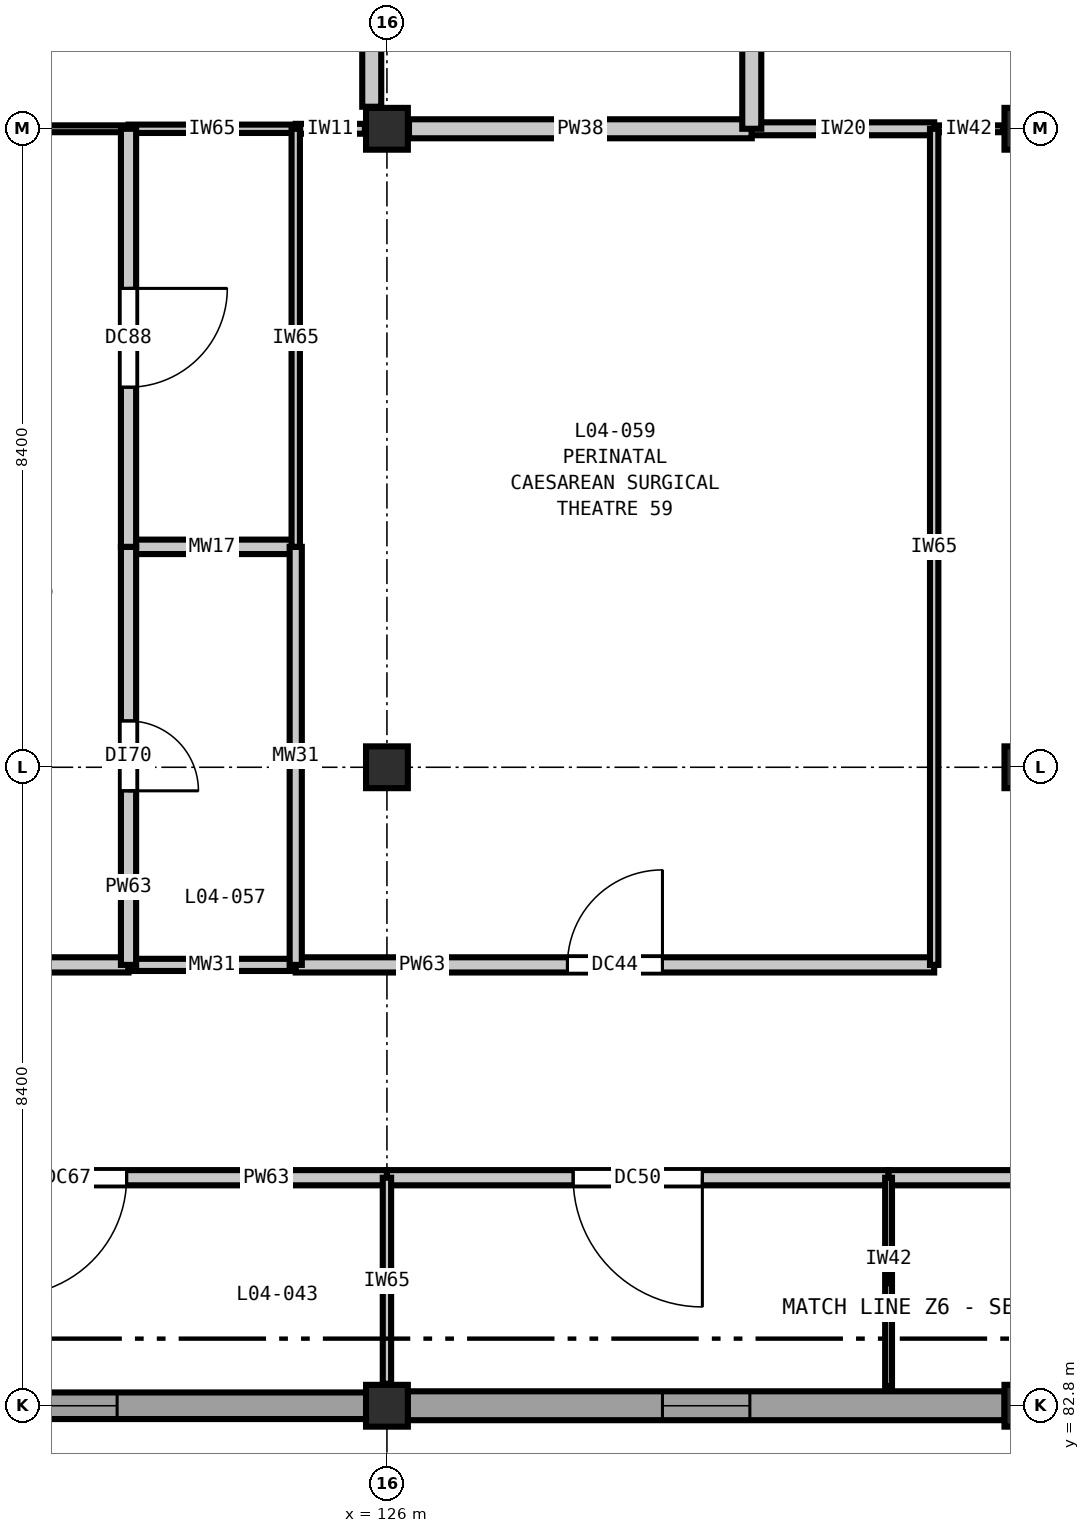
"""IFC4 building model, lengths in metres.
Left out: names, types, materials, properties, quantities, classifications, styles, units other than length and angle.
Written with IfcOpenShell. Run it as: python <this file> out.ifc"""

import sys

from ifc_helpers import new_model, si_unit, direction, frame, frame_2d, origin, origin_2d, place, context, subcontext, project, spatial, rectangle, extrude, element, fill, save


model = new_model("IFC4")
c1 = context("Model", 3, precision=1e-05, world=origin(), true_north=direction((0.0, 1.0)))
c2 = subcontext(c1, "Body", "Model", "MODEL_VIEW")
j1 = project(units=[si_unit("LENGTHUNIT", "METRE"), si_unit("PLANEANGLEUNIT", "RADIAN")], contexts=[c1])
p1 = place(None, origin())
s1 = spatial("IfcSite", under=j1, at=p1, CompositionType="ELEMENT")
p2 = place(p1, origin())
s2 = spatial("IfcBuilding", under=s1, at=p2, CompositionType="ELEMENT")
p3 = place(p2, frame((0.0, 0.0, 20.4)))
s3 = spatial("IfcBuildingStorey", under=s2, at=p3, CompositionType="ELEMENT", Elevation=20.4)
for number, where, z_axis, x_axis in (
    (1, (126.0, 82.8, 0.0), (0.0, 0.0, 1.0), (1.0, 0.0, 0.0)),
    (2, (126.0, 91.2, 0.0), (0.0, 0.0, 1.0), (1.0, 0.0, 0.0)),
    (3, (126.0, 99.6, 0.0), (0.0, 0.0, 1.0), (1.0, 0.0, 0.0)),
    (4, (134.4, 82.8, 0.0), (0.0, 0.0, 1.0), (1.0, 0.0, 0.0)),
    (5, (134.4, 91.2, 0.0), (0.0, 0.0, 1.0), (1.0, 0.0, 0.0)),
    (6, (134.4, 99.6, 0.0), (0.0, 0.0, 1.0), (1.0, 0.0, 0.0)),
):
    element("IfcColumn", number, at=place(p3, frame(where, z_axis=z_axis, x_axis=x_axis)), inside=s3, PredefinedType="COLUMN", context=c2, shape_type="SweptSolid", body=[
        extrude(rectangle(XDim=0.55, YDim=0.55, at=origin_2d()), origin(), (0.0, 0.0, 1.0), 4.2),
    ])
p4 = place(p3, frame((134.127, 82.8, 0.0), z_axis=(0.0, 0.0, 1.0), x_axis=(-1.0, 0.0, 0.0)))
e7 = element("IfcWall", 7, at=p4, inside=s3, PredefinedType="SOLIDWALL", context=c2, shape_type="SweptSolid", body=[
    extrude(rectangle(XDim=7.854, YDim=0.38, at=frame_2d((3.927, 0.0))), origin(), (0.0, 0.0, 1.0), 3.48),
])
p5 = place(p4, frame((3.352, 0.0, 0.9)))
e8 = element("IfcOpeningElement", 8, at=p5, cuts=e7, PredefinedType="OPENING", context=c2, shape_type="SweptSolid", body=[
    extrude(rectangle(XDim=1.15, YDim=1.75, at=frame_2d((0.575, 0.875))), frame((0.0, 0.2, 0.0), z_axis=(0.0, -1.0, 0.0), x_axis=(1.0, 0.0, 0.0)), (0.0, 0.0, 1.0), 0.4),
])
p6 = place(p3, frame((125.727, 82.8, 0.0), z_axis=(0.0, 0.0, 1.0), x_axis=(-1.0, 0.0, 0.0)))
e9 = element("IfcWall", 9, at=p6, inside=s3, PredefinedType="SOLIDWALL", context=c2, shape_type="SweptSolid", body=[
    extrude(rectangle(XDim=7.854, YDim=0.35, at=frame_2d((3.927, 0.0))), origin(), (0.0, 0.0, 1.0), 3.48),
])
p7 = place(p6, frame((3.277, 0.0, 0.9)))
e10 = element("IfcOpeningElement", 10, at=p7, cuts=e9, PredefinedType="OPENING", context=c2, shape_type="SweptSolid", body=[
    extrude(rectangle(XDim=1.3, YDim=1.75, at=frame_2d((0.65, 0.875))), frame((0.0, 0.185, 0.0), z_axis=(0.0, -1.0, 0.0), x_axis=(1.0, 0.0, 0.0)), (0.0, 0.0, 1.0), 0.37),
])
p8 = place(p3, frame((117.6, 85.8, 0.0), z_axis=(0.0, 0.0, 1.0), x_axis=(1.0, 0.0, 0.0)))
e11 = element("IfcWall", 11, at=p8, inside=s3, PredefinedType="PARTITIONING", context=c2, shape_type="SweptSolid", body=[
    extrude(rectangle(XDim=8.4, YDim=0.2, at=frame_2d((4.2, 0.0))), origin(), (0.0, 0.0, 1.0), 3.82),
])
p9 = place(p8, frame((3.425, 0.0, 0.0)))
e12 = element("IfcOpeningElement", 12, at=p9, cuts=e11, PredefinedType="OPENING", context=c2, shape_type="SweptSolid", body=[
    extrude(rectangle(XDim=1.55, YDim=2.25, at=frame_2d((0.775, 1.125))), frame((0.0, 0.11, 0.0), z_axis=(0.0, -1.0, 0.0), x_axis=(1.0, 0.0, 0.0)), (0.0, 0.0, 1.0), 0.22),
])
p10 = place(p3, frame((126.0, 85.8, 0.0), z_axis=(0.0, 0.0, 1.0), x_axis=(1.0, 0.0, 0.0)))
e13 = element("IfcWall", 13, at=p10, inside=s3, PredefinedType="PARTITIONING", context=c2, shape_type="SweptSolid", body=[
    extrude(rectangle(XDim=6.6, YDim=0.2, at=frame_2d((3.3, 0.0))), origin(), (0.0, 0.0, 1.0), 3.82),
])
p11 = place(p10, frame((2.45, 0.0, 0.0)))
e14 = element("IfcOpeningElement", 14, at=p11, cuts=e13, PredefinedType="OPENING", context=c2, shape_type="SweptSolid", body=[
    extrude(rectangle(XDim=1.7, YDim=2.3, at=frame_2d((0.85, 1.15))), frame((0.0, 0.11, 0.0), z_axis=(0.0, -1.0, 0.0), x_axis=(1.0, 0.0, 0.0)), (0.0, 0.0, 1.0), 0.22),
])
p12 = place(p3, frame((132.6, 85.8, 0.0), z_axis=(0.0, 0.0, 1.0), x_axis=(1.0, 0.0, 0.0)))
e15 = element("IfcWall", 15, at=p12, inside=s3, PredefinedType="PARTITIONING", context=c2, shape_type="SweptSolid", body=[
    extrude(rectangle(XDim=8.4, YDim=0.2, at=frame_2d((4.2, 0.0))), origin(), (0.0, 0.0, 1.0), 3.82),
])
p13 = place(p12, frame((3.275, 0.0, 0.0)))
e16 = element("IfcOpeningElement", 16, at=p13, cuts=e15, PredefinedType="OPENING", context=c2, shape_type="SweptSolid", body=[
    extrude(rectangle(XDim=1.85, YDim=2.3, at=frame_2d((0.925, 1.15))), frame((0.0, 0.11, 0.0), z_axis=(0.0, -1.0, 0.0), x_axis=(1.0, 0.0, 0.0)), (0.0, 0.0, 1.0), 0.22),
])
p14 = place(p3, frame((118.2, 88.6, 0.0), z_axis=(0.0, 0.0, 1.0), x_axis=(1.0, 0.0, 0.0)))
e17 = element("IfcWall", 17, at=p14, inside=s3, PredefinedType="PARTITIONING", context=c2, shape_type="SweptSolid", body=[
    extrude(rectangle(XDim=4.4, YDim=0.2, at=frame_2d((2.2, 0.0))), origin(), (0.0, 0.0, 1.0), 3.82),
])
p15 = place(p14, frame((1.275, 0.0, 0.0)))
e18 = element("IfcOpeningElement", 18, at=p15, cuts=e17, PredefinedType="OPENING", context=c2, shape_type="SweptSolid", body=[
    extrude(rectangle(XDim=1.85, YDim=2.3, at=frame_2d((0.925, 1.15))), frame((0.0, 0.11, 0.0), z_axis=(0.0, -1.0, 0.0), x_axis=(1.0, 0.0, 0.0)), (0.0, 0.0, 1.0), 0.22),
])
p16 = place(p3, frame((122.6, 88.6, 0.0), z_axis=(0.0, 0.0, 1.0), x_axis=(1.0, 0.0, 0.0)))
e19 = element("IfcWall", 19, at=p16, inside=s3, PredefinedType="PLUMBINGWALL", context=c2, shape_type="SweptSolid", body=[
    extrude(rectangle(XDim=2.2, YDim=0.16, at=frame_2d((1.1, 0.0))), origin(), (0.0, 0.0, 1.0), 3.82),
])
p17 = place(p3, frame((124.8, 88.6, 0.0), z_axis=(0.0, 0.0, 1.0), x_axis=(1.0, 0.0, 0.0)))
e20 = element("IfcWall", 20, at=p17, inside=s3, PredefinedType="PARTITIONING", context=c2, shape_type="SweptSolid", body=[
    extrude(rectangle(XDim=8.4, YDim=0.2, at=frame_2d((4.2, 0.0))), origin(), (0.0, 0.0, 1.0), 3.82),
])
p18 = place(p17, frame((3.575, 0.0, 0.0)))
e21 = element("IfcOpeningElement", 21, at=p18, cuts=e20, PredefinedType="OPENING", context=c2, shape_type="SweptSolid", body=[
    extrude(rectangle(XDim=1.25, YDim=2.15, at=frame_2d((0.625, 1.075))), frame((0.0, 0.11, 0.0), z_axis=(0.0, -1.0, 0.0), x_axis=(1.0, 0.0, 0.0)), (0.0, 0.0, 1.0), 0.22),
])
p19 = place(p3, frame((122.6, 94.1, 0.0), z_axis=(0.0, 0.0, 1.0), x_axis=(1.0, 0.0, 0.0)))
e22 = element("IfcWall", 22, at=p19, inside=s3, PredefinedType="PLUMBINGWALL", context=c2, shape_type="SweptSolid", body=[
    extrude(rectangle(XDim=2.2, YDim=0.19, at=frame_2d((1.1, 0.0))), origin(), (0.0, 0.0, 1.0), 3.82),
])
p20 = place(p3, frame((118.8, 99.6, 0.0), z_axis=(0.0, 0.0, 1.0), x_axis=(1.0, 0.0, 0.0)))
e23 = element("IfcWall", 23, at=p20, inside=s3, PredefinedType="PARTITIONING", context=c2, shape_type="SweptSolid", body=[
    extrude(rectangle(XDim=3.8, YDim=0.09, at=frame_2d((1.9, 0.0))), origin(), (0.0, 0.0, 1.0), 3.585),
])
p21 = place(p3, frame((122.6, 99.6, 0.0), z_axis=(0.0, 0.0, 1.0), x_axis=(1.0, 0.0, 0.0)))
e24 = element("IfcWall", 24, at=p21, inside=s3, PredefinedType="PARTITIONING", context=c2, shape_type="SweptSolid", body=[
    extrude(rectangle(XDim=2.2, YDim=0.11, at=frame_2d((1.1, 0.0))), origin(), (0.0, 0.0, 1.0), 3.585),
])
p22 = place(p3, frame((124.8, 99.6, 0.0), z_axis=(0.0, 0.0, 1.0), x_axis=(1.0, 0.0, 0.0)))
e25 = element("IfcWall", 25, at=p22, inside=s3, PredefinedType="PARTITIONING", context=c2, shape_type="SweptSolid", body=[
    extrude(rectangle(XDim=0.91, YDim=0.13, at=frame_2d((0.455, 0.0))), origin(), (0.0, 0.0, 1.0), 3.585),
])
p23 = place(p3, frame((126.29, 99.6, 0.0), z_axis=(0.0, 0.0, 1.0), x_axis=(1.0, 0.0, 0.0)))
e26 = element("IfcWall", 26, at=p23, inside=s3, PredefinedType="PARTITIONING", context=c2, shape_type="SweptSolid", body=[
    extrude(rectangle(XDim=4.51, YDim=0.25, at=frame_2d((2.255, 0.0))), origin(), (0.0, 0.0, 1.0), 3.585),
])
p24 = place(p3, frame((130.8, 99.6, 0.0), z_axis=(0.0, 0.0, 1.0), x_axis=(1.0, 0.0, 0.0)))
e27 = element("IfcWall", 27, at=p24, inside=s3, PredefinedType="PARTITIONING", context=c2, shape_type="SweptSolid", body=[
    extrude(rectangle(XDim=2.4, YDim=0.17, at=frame_2d((1.2, 0.0))), origin(), (0.0, 0.0, 1.0), 3.585),
])
p25 = place(p3, frame((133.2, 99.6, 0.0), z_axis=(0.0, 0.0, 1.0), x_axis=(1.0, 0.0, 0.0)))
e28 = element("IfcWall", 28, at=p25, inside=s3, PredefinedType="PARTITIONING", context=c2, shape_type="SweptSolid", body=[
    extrude(rectangle(XDim=0.91, YDim=0.09, at=frame_2d((0.455, 0.0))), origin(), (0.0, 0.0, 1.0), 3.585),
])
p26 = place(p3, frame((122.6, 88.6, 0.0), z_axis=(0.0, 0.0, 1.0), x_axis=(0.0, 1.0, 0.0)))
e29 = element("IfcWall", 29, at=p26, inside=s3, PredefinedType="PARTITIONING", context=c2, shape_type="SweptSolid", body=[
    extrude(rectangle(XDim=5.5, YDim=0.2, at=frame_2d((2.75, 0.0))), origin(), (0.0, 0.0, 1.0), 3.82),
])
p27 = place(p26, frame((2.29, 0.0, 0.0)))
e30 = element("IfcOpeningElement", 30, at=p27, cuts=e29, PredefinedType="OPENING", context=c2, shape_type="SweptSolid", body=[
    extrude(rectangle(XDim=0.92, YDim=2.1, at=frame_2d((0.46, 1.05))), frame((0.0, 0.11, 0.0), z_axis=(0.0, -1.0, 0.0), x_axis=(1.0, 0.0, 0.0)), (0.0, 0.0, 1.0), 0.22),
])
p28 = place(p3, frame((122.6, 94.1, 0.0), z_axis=(0.0, 0.0, 1.0), x_axis=(0.0, 1.0, 0.0)))
e31 = element("IfcWall", 31, at=p28, inside=s3, PredefinedType="PARTITIONING", context=c2, shape_type="SweptSolid", body=[
    extrude(rectangle(XDim=5.5, YDim=0.2, at=frame_2d((2.75, 0.0))), origin(), (0.0, 0.0, 1.0), 3.82),
])
p29 = place(p28, frame((2.1, 0.0, 0.0)))
e32 = element("IfcOpeningElement", 32, at=p29, cuts=e31, PredefinedType="OPENING", context=c2, shape_type="SweptSolid", body=[
    extrude(rectangle(XDim=1.3, YDim=2.2, at=frame_2d((0.65, 1.1))), frame((0.0, 0.11, 0.0), z_axis=(0.0, -1.0, 0.0), x_axis=(1.0, 0.0, 0.0)), (0.0, 0.0, 1.0), 0.22),
])
p30 = place(p3, frame((124.8, 88.6, 0.0), z_axis=(0.0, 0.0, 1.0), x_axis=(0.0, 1.0, 0.0)))
e33 = element("IfcWall", 33, at=p30, inside=s3, PredefinedType="PLUMBINGWALL", context=c2, shape_type="SweptSolid", body=[
    extrude(rectangle(XDim=5.5, YDim=0.16, at=frame_2d((2.75, 0.0))), origin(), (0.0, 0.0, 1.0), 3.82),
])
p31 = place(p3, frame((124.8, 94.1, 0.0), z_axis=(0.0, 0.0, 1.0), x_axis=(0.0, 1.0, 0.0)))
e34 = element("IfcWall", 34, at=p31, inside=s3, PredefinedType="PARTITIONING", context=c2, shape_type="SweptSolid", body=[
    extrude(rectangle(XDim=5.5, YDim=0.11, at=frame_2d((2.75, 0.0))), origin(), (0.0, 0.0, 1.0), 3.82),
])
p32 = place(p3, frame((125.8, 99.89, 0.0), z_axis=(0.0, 0.0, 1.0), x_axis=(0.0, 1.0, 0.0)))
e35 = element("IfcWall", 35, at=p32, inside=s3, PredefinedType="PARTITIONING", context=c2, shape_type="SweptSolid", body=[
    extrude(rectangle(XDim=2.595, YDim=0.25, at=frame_2d((1.298, 0.0))), origin(), (0.0, 0.0, 1.0), 3.585),
])
p33 = place(p3, frame((126.0, 83.09, 0.0), z_axis=(0.0, 0.0, 1.0), x_axis=(0.0, 1.0, 0.0)))
e36 = element("IfcWall", 36, at=p33, inside=s3, PredefinedType="PARTITIONING", context=c2, shape_type="SweptSolid", body=[
    extrude(rectangle(XDim=2.71, YDim=0.11, at=frame_2d((1.355, 0.0))), origin(), (0.0, 0.0, 1.0), 3.585),
])
p34 = place(p3, frame((130.8, 99.6, 0.0), z_axis=(0.0, 0.0, 1.0), x_axis=(0.0, 1.0, 0.0)))
e37 = element("IfcWall", 37, at=p34, inside=s3, PredefinedType="PARTITIONING", context=c2, shape_type="SweptSolid", body=[
    extrude(rectangle(XDim=13.6, YDim=0.25, at=frame_2d((6.8, 0.0))), origin(), (0.0, 0.0, 1.0), 3.82),
])
p35 = place(p3, frame((132.6, 83.06, 0.0), z_axis=(0.0, 0.0, 1.0), x_axis=(0.0, 1.0, 0.0)))
e38 = element("IfcWall", 38, at=p35, inside=s3, PredefinedType="PARTITIONING", context=c2, shape_type="SweptSolid", body=[
    extrude(rectangle(XDim=2.74, YDim=0.09, at=frame_2d((1.37, 0.0))), origin(), (0.0, 0.0, 1.0), 3.82),
])
p36 = place(p3, frame((133.2, 88.6, 0.0), z_axis=(0.0, 0.0, 1.0), x_axis=(0.0, 1.0, 0.0)))
e39 = element("IfcWall", 39, at=p36, inside=s3, PredefinedType="PARTITIONING", context=c2, shape_type="SweptSolid", body=[
    extrude(rectangle(XDim=11.0, YDim=0.11, at=frame_2d((5.5, 0.0))), origin(), (0.0, 0.0, 1.0), 3.82),
])
p37 = place(p5, origin())
e40 = element("IfcWindow", 40, at=p37, inside=s3, PartitioningType="SINGLE_PANEL", PredefinedType="WINDOW", context=c2, shape_type="SweptSolid", body=[
    extrude(rectangle(XDim=1.15, YDim=1.75, at=frame_2d((0.575, 0.875))), frame((0.0, 0.03, 0.0), z_axis=(0.0, -1.0, 0.0), x_axis=(1.0, 0.0, 0.0)), (0.0, 0.0, 1.0), 0.06),
])
fill(e8, e40)
p38 = place(p7, origin())
e41 = element("IfcWindow", 41, at=p38, inside=s3, PartitioningType="SINGLE_PANEL", PredefinedType="WINDOW", context=c2, shape_type="SweptSolid", body=[
    extrude(rectangle(XDim=1.3, YDim=1.75, at=frame_2d((0.65, 0.875))), frame((0.0, 0.03, 0.0), z_axis=(0.0, -1.0, 0.0), x_axis=(1.0, 0.0, 0.0)), (0.0, 0.0, 1.0), 0.06),
])
fill(e10, e41)
p39 = place(p9, frame((1.55, 0.0, 0.0), z_axis=(0.0, 0.0, 1.0), x_axis=(-1.0, 0.0, 0.0)))
e42 = element("IfcDoor", 42, at=p39, inside=s3, OperationType="SINGLE_SWING_RIGHT", PredefinedType="DOOR", context=c2, shape_type="SweptSolid", body=[
    extrude(rectangle(XDim=1.55, YDim=2.25, at=frame_2d((0.775, 1.125))), frame((0.0, 0.025, 0.0), z_axis=(0.0, -1.0, 0.0), x_axis=(1.0, 0.0, 0.0)), (0.0, 0.0, 1.0), 0.05),
])
fill(e12, e42)
p40 = place(p11, frame((1.7, 0.0, 0.0), z_axis=(0.0, 0.0, 1.0), x_axis=(-1.0, 0.0, 0.0)))
e43 = element("IfcDoor", 43, at=p40, inside=s3, OperationType="SINGLE_SWING_LEFT", PredefinedType="DOOR", context=c2, shape_type="SweptSolid", body=[
    extrude(rectangle(XDim=1.7, YDim=2.3, at=frame_2d((0.85, 1.15))), frame((0.0, 0.025, 0.0), z_axis=(0.0, -1.0, 0.0), x_axis=(1.0, 0.0, 0.0)), (0.0, 0.0, 1.0), 0.05),
])
fill(e14, e43)
p41 = place(p18, origin())
e44 = element("IfcDoor", 44, at=p41, inside=s3, OperationType="SINGLE_SWING_RIGHT", PredefinedType="DOOR", context=c2, shape_type="SweptSolid", body=[
    extrude(rectangle(XDim=1.25, YDim=2.15, at=frame_2d((0.625, 1.075))), frame((0.0, 0.025, 0.0), z_axis=(0.0, -1.0, 0.0), x_axis=(1.0, 0.0, 0.0)), (0.0, 0.0, 1.0), 0.05),
])
fill(e21, e44)
p42 = place(p27, frame((0.92, 0.0, 0.0), z_axis=(0.0, 0.0, 1.0), x_axis=(-1.0, 0.0, 0.0)))
e45 = element("IfcDoor", 45, at=p42, inside=s3, OperationType="SINGLE_SWING_RIGHT", PredefinedType="DOOR", context=c2, shape_type="SweptSolid", body=[
    extrude(rectangle(XDim=0.92, YDim=2.1, at=frame_2d((0.46, 1.05))), frame((0.0, 0.025, 0.0), z_axis=(0.0, -1.0, 0.0), x_axis=(1.0, 0.0, 0.0)), (0.0, 0.0, 1.0), 0.05),
])
fill(e30, e45)
p43 = place(p29, frame((1.3, 0.0, 0.0), z_axis=(0.0, 0.0, 1.0), x_axis=(-1.0, 0.0, 0.0)))
e46 = element("IfcDoor", 46, at=p43, inside=s3, OperationType="SINGLE_SWING_LEFT", PredefinedType="DOOR", context=c2, shape_type="SweptSolid", body=[
    extrude(rectangle(XDim=1.3, YDim=2.2, at=frame_2d((0.65, 1.1))), frame((0.0, 0.025, 0.0), z_axis=(0.0, -1.0, 0.0), x_axis=(1.0, 0.0, 0.0)), (0.0, 0.0, 1.0), 0.05),
])
fill(e32, e46)
save(model, sys.argv[1])
